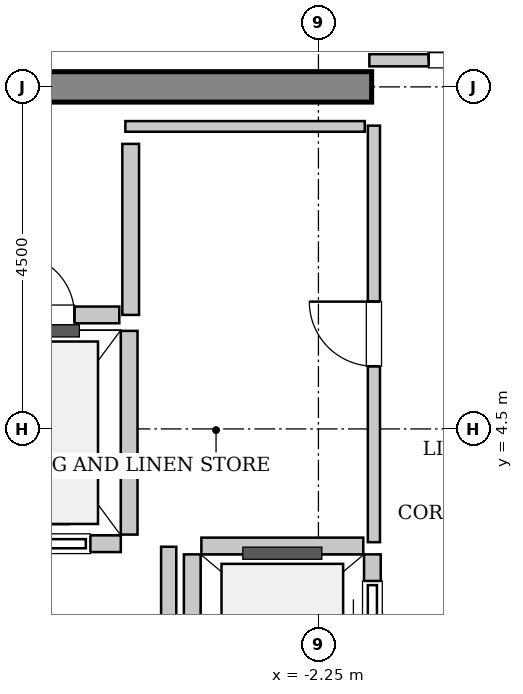
"""IFC4 building model, lengths in metres.
Left out: names, types, materials, properties, quantities, classifications, styles, units other than length and angle.
Written with IfcOpenShell. Run it as: python <this file> out.ifc"""

import sys

from ifc_helpers import new_model, si_unit, direction, frame, frame_2d, origin, place, context, subcontext, project, spatial, rectangle, extrude, source, transform, mapped, element, fill, save


model = new_model("IFC4")
c1 = context("Model", 3, precision=1e-05, world=origin(), true_north=direction((0.0, 1.0)))
c2 = subcontext(c1, "Body", "Model", "MODEL_VIEW")
j1 = project(units=[si_unit("LENGTHUNIT", "METRE"), si_unit("PLANEANGLEUNIT", "RADIAN")], contexts=[c1])
p1 = place(None, origin())
s1 = spatial("IfcSite", under=j1, at=p1, CompositionType="ELEMENT")
p2 = place(p1, origin())
s2 = spatial("IfcBuilding", under=s1, at=p2, CompositionType="ELEMENT")
p3 = place(p2, frame((0.0, 0.0, 326.2)))
s3 = spatial("IfcBuildingStorey", under=s2, at=p3, CompositionType="ELEMENT", Elevation=326.2)
m1 = source(origin(), c2, "Body", "SweptSolid", [
    extrude(rectangle(XDim=9.9, YDim=0.4, at=frame_2d((4.95, 0.0))), origin(), (0.0, 0.0, 1.0), 3.8),
])
p4 = place(p3, frame((-11.45, 9.0, 0.0), z_axis=(0.0, 0.0, 1.0), x_axis=(1.0, 0.0, 0.0)))
e1 = element("IfcWall", 1, at=p4, inside=s3, PredefinedType="SHEAR", context=c2, shape_type="MappedRepresentation", body=[
    mapped(m1, transform((0.0, 0.0, 0.0), x_axis=(1.0, 0.0, 0.0), y_axis=(0.0, 1.0, 0.0), z_axis=(0.0, 0.0, 1.0), scale=1.0)),
])
m2 = source(origin(), c2, "Body", "SweptSolid", [
    extrude(rectangle(XDim=2.0, YDim=0.22, at=frame_2d((1.0, 0.0))), origin(), (0.0, 0.0, 1.0), 3.535),
])
p5 = place(p3, frame((-6.85, 2.99, 0.0), z_axis=(0.0, 0.0, 1.0), x_axis=(1.0, 0.0, 0.0)))
e2 = element("IfcWall", 2, at=p5, inside=s3, PredefinedType="SOLIDWALL", context=c2, shape_type="MappedRepresentation", body=[
    mapped(m2, transform((0.0, 0.0, 0.0), x_axis=(1.0, 0.0, 0.0), y_axis=(0.0, 1.0, 0.0), z_axis=(0.0, 0.0, 1.0), scale=1.0)),
])
p6 = place(p5, frame((0.4, 0.0, 0.0)))
e3 = element("IfcOpeningElement", 3, at=p6, cuts=e2, PredefinedType="OPENING", context=c2, shape_type="SweptSolid", body=[
    extrude(rectangle(XDim=1.2, YDim=2.2, at=frame_2d((0.6, 1.1))), frame((0.0, 0.12, 0.0), z_axis=(0.0, -1.0, 0.0), x_axis=(1.0, 0.0, 0.0)), (0.0, 0.0, 1.0), 0.24),
])
m3 = source(origin(), c2, "Body", "SweptSolid", [
    extrude(rectangle(XDim=2.68, YDim=0.22, at=frame_2d((1.34, 0.0))), origin(), (0.0, 0.0, 1.0), 3.535),
])
p7 = place(p3, frame((-4.74, 3.11, 0.0), z_axis=(0.0, 0.0, 1.0), x_axis=(0.0, 1.0, 0.0)))
e4 = element("IfcWall", 4, at=p7, inside=s3, PredefinedType="SOLIDWALL", context=c2, shape_type="MappedRepresentation", body=[
    mapped(m3, transform((0.0, 0.0, 0.0), x_axis=(1.0, 0.0, 0.0), y_axis=(0.0, 1.0, 0.0), z_axis=(0.0, 0.0, 1.0), scale=1.0)),
])
m4 = source(origin(), c2, "Body", "SweptSolid", [
    extrude(rectangle(XDim=5.7, YDim=0.22, at=frame_2d((2.85, 0.0))), origin(), (0.0, 0.0, 1.0), 3.535),
])
p8 = place(p3, frame((-1.54, -2.85, 0.0), z_axis=(0.0, 0.0, 1.0), x_axis=(0.0, 1.0, 0.0)))
e5 = element("IfcWall", 5, at=p8, inside=s3, PredefinedType="SOLIDWALL", context=c2, shape_type="MappedRepresentation", body=[
    mapped(m4, transform((0.0, 0.0, 0.0), x_axis=(1.0, 0.0, 0.0), y_axis=(0.0, 1.0, 0.0), z_axis=(0.0, 0.0, 1.0), scale=1.0)),
])
p9 = place(p8, frame((0.35, 0.0, 0.0)))
e6 = element("IfcOpeningElement", 6, at=p9, cuts=e5, PredefinedType="OPENING", context=c2, shape_type="SweptSolid", body=[
    extrude(rectangle(XDim=1.1, YDim=2.2, at=frame_2d((0.55, 1.1))), frame((0.0, 0.12, 0.0), z_axis=(0.0, -1.0, 0.0), x_axis=(1.0, 0.0, 0.0)), (0.0, 0.0, 1.0), 0.24),
])
p10 = place(p8, frame((2.3, 0.0, 0.0)))
e7 = element("IfcOpeningElement", 7, at=p10, cuts=e5, PredefinedType="OPENING", context=c2, shape_type="SweptSolid", body=[
    extrude(rectangle(XDim=1.1, YDim=2.2, at=frame_2d((0.55, 1.1))), frame((0.0, 0.12, 0.0), z_axis=(0.0, -1.0, 0.0), x_axis=(1.0, 0.0, 0.0)), (0.0, 0.0, 1.0), 0.24),
])
p11 = place(p8, frame((4.25, 0.0, 0.0)))
e8 = element("IfcOpeningElement", 8, at=p11, cuts=e5, PredefinedType="OPENING", context=c2, shape_type="SweptSolid", body=[
    extrude(rectangle(XDim=1.1, YDim=2.2, at=frame_2d((0.55, 1.1))), frame((0.0, 0.12, 0.0), z_axis=(0.0, -1.0, 0.0), x_axis=(1.0, 0.0, 0.0)), (0.0, 0.0, 1.0), 0.24),
])
p12 = place(p3, frame((-3.91, 2.85, 0.0), z_axis=(0.0, 0.0, 1.0), x_axis=(0.0, -1.0, 0.0)))
e9 = element("IfcWall", 9, at=p12, inside=s3, PredefinedType="SOLIDWALL", context=c2, shape_type="MappedRepresentation", body=[
    mapped(m4, transform((0.0, 0.0, 0.0), x_axis=(1.0, 0.0, 0.0), y_axis=(0.0, 1.0, 0.0), z_axis=(0.0, 0.0, 1.0), scale=1.0)),
])
m5 = source(origin(), c2, "Body", "SweptSolid", [
    extrude(rectangle(XDim=2.13, YDim=0.22, at=frame_2d((1.065, 0.0))), origin(), (0.0, 0.0, 1.0), 3.535),
])
p13 = place(p3, frame((-1.66, 2.96, 0.0), z_axis=(0.0, 0.0, 1.0), x_axis=(-1.0, 0.0, 0.0)))
e10 = element("IfcWall", 10, at=p13, inside=s3, PredefinedType="SOLIDWALL", context=c2, shape_type="MappedRepresentation", body=[
    mapped(m5, transform((0.0, 0.0, 0.0), x_axis=(1.0, 0.0, 0.0), y_axis=(0.0, 1.0, 0.0), z_axis=(0.0, 0.0, 1.0), scale=1.0)),
])
m6 = source(origin(), c2, "Body", "SweptSolid", [
    extrude(rectangle(XDim=2.25, YDim=0.22, at=frame_2d((1.125, 0.0))), origin(), (0.0, 0.0, 1.0), 3.535),
])
p14 = place(p3, frame((-4.72, 6.0, 0.0), z_axis=(0.0, 0.0, 1.0), x_axis=(0.0, 1.0, 0.0)))
e11 = element("IfcWall", 11, at=p14, inside=s3, PredefinedType="SOLIDWALL", context=c2, shape_type="MappedRepresentation", body=[
    mapped(m6, transform((0.0, 0.0, 0.0), x_axis=(1.0, 0.0, 0.0), y_axis=(0.0, 1.0, 0.0), z_axis=(0.0, 0.0, 1.0), scale=1.0)),
])
m7 = source(origin(), c2, "Body", "SweptSolid", [
    extrude(rectangle(XDim=1.98, YDim=0.22, at=frame_2d((0.99, 0.0))), origin(), (0.0, 0.0, 1.0), 3.535),
])
p15 = place(p3, frame((-6.85, 6.0, 0.0), z_axis=(0.0, 0.0, 1.0), x_axis=(1.0, 0.0, 0.0)))
e12 = element("IfcWall", 12, at=p15, inside=s3, PredefinedType="SOLIDWALL", context=c2, shape_type="MappedRepresentation", body=[
    mapped(m7, transform((0.0, 0.0, 0.0), x_axis=(1.0, 0.0, 0.0), y_axis=(0.0, 1.0, 0.0), z_axis=(0.0, 0.0, 1.0), scale=1.0)),
])
p16 = place(p15, frame((0.59, 0.0, 0.0)))
e13 = element("IfcOpeningElement", 13, at=p16, cuts=e12, PredefinedType="OPENING", context=c2, shape_type="SweptSolid", body=[
    extrude(rectangle(XDim=0.8, YDim=2.0, at=frame_2d((0.4, 1.0))), frame((0.0, 0.12, 0.0), z_axis=(0.0, -1.0, 0.0), x_axis=(1.0, 0.0, 0.0)), (0.0, 0.0, 1.0), 0.24),
])
m8 = source(origin(), c2, "Body", "SweptSolid", [
    extrude(rectangle(XDim=5.9, YDim=0.2, at=frame_2d((2.95, 0.0))), origin(), (0.0, 0.0, 1.0), 3.535),
])
p17 = place(p3, frame((-4.22, -2.95, 0.0), z_axis=(0.0, 0.0, 1.0), x_axis=(0.0, 1.0, 0.0)))
e14 = element("IfcWall", 14, at=p17, inside=s3, PredefinedType="PARTITIONING", context=c2, shape_type="MappedRepresentation", body=[
    mapped(m8, transform((0.0, 0.0, 0.0), x_axis=(1.0, 0.0, 0.0), y_axis=(0.0, 1.0, 0.0), z_axis=(0.0, 0.0, 1.0), scale=1.0)),
])
m9 = source(origin(), c2, "Body", "SweptSolid", [
    extrude(rectangle(XDim=3.16, YDim=0.16, at=frame_2d((1.58, 0.0))), origin(), (0.0, 0.0, 1.0), 2.625),
])
p18 = place(p3, frame((-1.58, 9.35, 0.0), z_axis=(0.0, 0.0, 1.0), x_axis=(1.0, 0.0, 0.0)))
e15 = element("IfcWall", 15, at=p18, inside=s3, PredefinedType="PARTITIONING", context=c2, shape_type="MappedRepresentation", body=[
    mapped(m9, transform((0.0, 0.0, 0.0), x_axis=(1.0, 0.0, 0.0), y_axis=(0.0, 1.0, 0.0), z_axis=(0.0, 0.0, 1.0), scale=1.0)),
])
p19 = place(p18, frame((0.78, 0.0, 0.0)))
e16 = element("IfcOpeningElement", 16, at=p19, cuts=e15, PredefinedType="OPENING", context=c2, shape_type="SweptSolid", body=[
    extrude(rectangle(XDim=1.6, YDim=2.3, at=frame_2d((0.8, 1.15))), frame((0.0, 0.09, 0.0), z_axis=(0.0, -1.0, 0.0), x_axis=(1.0, 0.0, 0.0)), (0.0, 0.0, 1.0), 0.18),
])
m10 = source(origin(), c2, "Body", "SweptSolid", [
    extrude(rectangle(XDim=5.48, YDim=0.16, at=frame_2d((2.74, 0.0))), origin(), (0.0, 0.0, 1.0), 3.535),
])
p20 = place(p3, frame((-1.52, 3.01, 0.0), z_axis=(0.0, 0.0, 1.0), x_axis=(0.0, 1.0, 0.0)))
e17 = element("IfcWall", 17, at=p20, inside=s3, PredefinedType="PARTITIONING", context=c2, shape_type="MappedRepresentation", body=[
    mapped(m10, transform((0.0, 0.0, 0.0), x_axis=(1.0, 0.0, 0.0), y_axis=(0.0, 1.0, 0.0), z_axis=(0.0, 0.0, 1.0), scale=1.0)),
])
p21 = place(p20, frame((2.315, 0.0, 0.0)))
e18 = element("IfcOpeningElement", 18, at=p21, cuts=e17, PredefinedType="OPENING", context=c2, shape_type="SweptSolid", body=[
    extrude(rectangle(XDim=0.85, YDim=2.1, at=frame_2d((0.425, 1.05))), frame((0.0, 0.09, 0.0), z_axis=(0.0, -1.0, 0.0), x_axis=(1.0, 0.0, 0.0)), (0.0, 0.0, 1.0), 0.18),
])
m11 = source(origin(), c2, "Body", "SweptSolid", [
    extrude(rectangle(XDim=3.15, YDim=0.14, at=frame_2d((1.575, 0.0))), origin(), (0.0, 0.0, 1.0), 3.535),
])
p22 = place(p3, frame((-4.79, 8.48, 0.0), z_axis=(0.0, 0.0, 1.0), x_axis=(1.0, 0.0, 0.0)))
e19 = element("IfcWall", 19, at=p22, inside=s3, PredefinedType="PARTITIONING", context=c2, shape_type="MappedRepresentation", body=[
    mapped(m11, transform((0.0, 0.0, 0.0), x_axis=(1.0, 0.0, 0.0), y_axis=(0.0, 1.0, 0.0), z_axis=(0.0, 0.0, 1.0), scale=1.0)),
])
m12 = source(origin(), c2, "Body", "SweptSolid", [
    extrude(rectangle(XDim=1.2, YDim=2.2, at=frame_2d((0.6, 1.1))), frame((0.0, 0.025, 0.0), z_axis=(0.0, -1.0, 0.0), x_axis=(1.0, 0.0, 0.0)), (0.0, 0.0, 1.0), 0.05),
])
p23 = place(p6, origin())
e20 = element("IfcDoor", 20, at=p23, inside=s3, OperationType="SLIDING_TO_LEFT", PredefinedType="DOOR", context=c2, shape_type="MappedRepresentation", body=[
    mapped(m12, transform((0.0, 0.0, 0.0), x_axis=(1.0, 0.0, 0.0), y_axis=(0.0, 1.0, 0.0), z_axis=(0.0, 0.0, 1.0), scale=1.0)),
])
fill(e3, e20)
m13 = source(origin(), c2, "Body", "SweptSolid", [
    extrude(rectangle(XDim=1.1, YDim=2.2, at=frame_2d((0.55, 1.1))), frame((0.0, 0.025, 0.0), z_axis=(0.0, -1.0, 0.0), x_axis=(1.0, 0.0, 0.0)), (0.0, 0.0, 1.0), 0.05),
])
p24 = place(p11, origin())
e21 = element("IfcDoor", 21, at=p24, inside=s3, OperationType="DOUBLE_DOOR_SLIDING", PredefinedType="DOOR", context=c2, shape_type="MappedRepresentation", body=[
    mapped(m13, transform((0.0, 0.0, 0.0), x_axis=(1.0, 0.0, 0.0), y_axis=(0.0, 1.0, 0.0), z_axis=(0.0, 0.0, 1.0), scale=1.0)),
])
fill(e8, e21)
m14 = source(origin(), c2, "Body", "SweptSolid", [
    extrude(rectangle(XDim=0.8, YDim=2.0, at=frame_2d((0.4, 1.0))), frame((0.0, 0.025, 0.0), z_axis=(0.0, -1.0, 0.0), x_axis=(1.0, 0.0, 0.0)), (0.0, 0.0, 1.0), 0.05),
])
p25 = place(p16, origin())
e22 = element("IfcDoor", 22, at=p25, inside=s3, OperationType="SINGLE_SWING_LEFT", PredefinedType="TRAPDOOR", context=c2, shape_type="MappedRepresentation", body=[
    mapped(m14, transform((0.0, 0.0, 0.0), x_axis=(1.0, 0.0, 0.0), y_axis=(0.0, 1.0, 0.0), z_axis=(0.0, 0.0, 1.0), scale=1.0)),
])
fill(e13, e22)
m15 = source(origin(), c2, "Body", "SweptSolid", [
    extrude(rectangle(XDim=1.6, YDim=2.3, at=frame_2d((0.8, 1.15))), frame((0.0, 0.025, 0.0), z_axis=(0.0, -1.0, 0.0), x_axis=(1.0, 0.0, 0.0)), (0.0, 0.0, 1.0), 0.05),
])
p26 = place(p19, origin())
e23 = element("IfcDoor", 23, at=p26, inside=s3, OperationType="DOUBLE_DOOR_SINGLE_SWING", PredefinedType="DOOR", context=c2, shape_type="MappedRepresentation", body=[
    mapped(m15, transform((0.0, 0.0, 0.0), x_axis=(1.0, 0.0, 0.0), y_axis=(0.0, 1.0, 0.0), z_axis=(0.0, 0.0, 1.0), scale=1.0)),
])
fill(e16, e23)
m16 = source(origin(), c2, "Body", "SweptSolid", [
    extrude(rectangle(XDim=0.85, YDim=2.1, at=frame_2d((0.425, 1.05))), frame((0.0, 0.025, 0.0), z_axis=(0.0, -1.0, 0.0), x_axis=(1.0, 0.0, 0.0)), (0.0, 0.0, 1.0), 0.05),
])
p27 = place(p21, origin())
e24 = element("IfcDoor", 24, at=p27, inside=s3, OperationType="SINGLE_SWING_RIGHT", PredefinedType="DOOR", context=c2, shape_type="MappedRepresentation", body=[
    mapped(m16, transform((0.0, 0.0, 0.0), x_axis=(1.0, 0.0, 0.0), y_axis=(0.0, 1.0, 0.0), z_axis=(0.0, 0.0, 1.0), scale=1.0)),
])
fill(e18, e24)
save(model, sys.argv[1])
